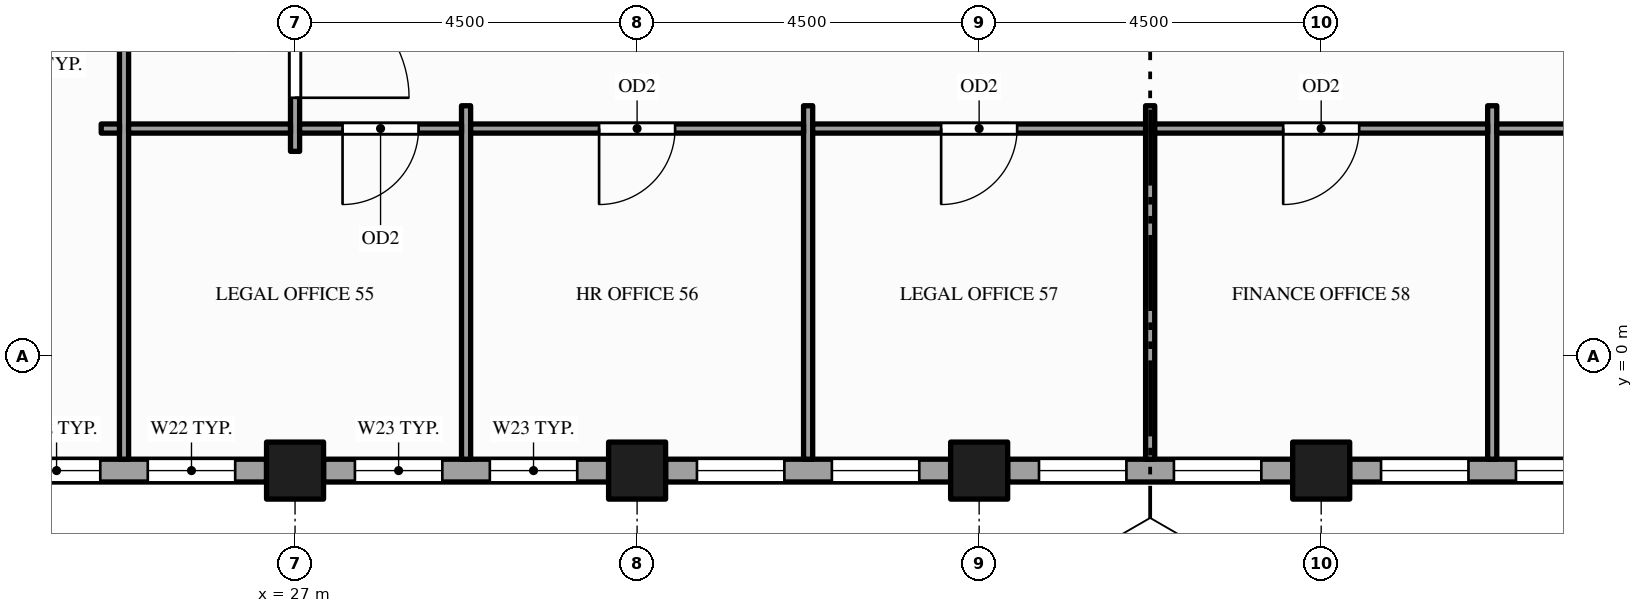
"""IFC4 building model, lengths in metres.
Left out: names, types, materials, properties, quantities, classifications, styles, units other than length and angle.
Written with IfcOpenShell. Run it as: python <this file> out.ifc"""

import sys

from ifc_helpers import new_model, si_unit, direction, frame, frame_2d, origin, origin_2d, place, context, subcontext, project, spatial, rectangle, hollow_rectangle, extrude, element, fill, save


model = new_model("IFC4")
c1 = context("Model", 3, precision=1e-05, world=origin(), true_north=direction((0.0, 1.0)))
c2 = subcontext(c1, "Body", "Model", "MODEL_VIEW")
j1 = project(units=[si_unit("LENGTHUNIT", "METRE"), si_unit("PLANEANGLEUNIT", "RADIAN")], contexts=[c1])
p1 = place(None, origin())
s1 = spatial("IfcSite", under=j1, at=p1, CompositionType="ELEMENT")
p2 = place(p1, origin())
s2 = spatial("IfcBuilding", under=s1, at=p2, CompositionType="ELEMENT")
p3 = place(p2, frame((0.0, 0.0, 195.0)))
s3 = spatial("IfcBuildingStorey", under=s2, at=p3, CompositionType="ELEMENT", Elevation=195.0)
for number, where, z_axis, x_axis in (
    (1, (27.0, -1.5, -0.15), (0.0, 0.0, 1.0), (1.0, 0.0, 0.0)),
    (2, (31.5, -1.5, -0.15), (0.0, 0.0, 1.0), (1.0, 0.0, 0.0)),
    (3, (36.0, -1.5, -0.15), (0.0, 0.0, 1.0), (1.0, 0.0, 0.0)),
    (4, (40.5, -1.5, -0.15), (0.0, 0.0, 1.0), (1.0, 0.0, 0.0)),
):
    element("IfcColumn", number, at=place(p3, frame(where, z_axis=z_axis, x_axis=x_axis)), inside=s3, PredefinedType="COLUMN", context=c2, shape_type="SweptSolid", body=[
        extrude(hollow_rectangle(XDim=0.75, YDim=0.75, WallThickness=0.036, at=origin_2d()), origin(), (0.0, 0.0, 1.0), 4.0),
    ])
p4 = place(p3, frame((22.875, -1.5, 0.0), z_axis=(0.0, 0.0, 1.0), x_axis=(1.0, 0.0, 0.0)))
e5 = element("IfcWall", 5, at=p4, inside=s3, PredefinedType="STANDARD", context=c2, shape_type="SweptSolid", body=[
    extrude(rectangle(XDim=3.75, YDim=0.3, at=frame_2d((1.875, 0.0))), origin(), (0.0, 0.0, 1.0), 2.76),
])
p5 = place(p4, frame((0.413, 0.0, 0.9)))
e6 = element("IfcOpeningElement", 6, at=p5, cuts=e5, PredefinedType="OPENING", context=c2, shape_type="SweptSolid", body=[
    extrude(rectangle(XDim=1.15, YDim=1.5, at=frame_2d((0.575, 0.75))), frame((0.0, 0.16, 0.0), z_axis=(0.0, -1.0, 0.0), x_axis=(1.0, 0.0, 0.0)), (0.0, 0.0, 1.0), 0.32),
])
p6 = place(p4, frame((2.188, 0.0, 0.9)))
e7 = element("IfcOpeningElement", 7, at=p6, cuts=e5, PredefinedType="OPENING", context=c2, shape_type="SweptSolid", body=[
    extrude(rectangle(XDim=1.15, YDim=1.5, at=frame_2d((0.575, 0.75))), frame((0.0, 0.16, 0.0), z_axis=(0.0, -1.0, 0.0), x_axis=(1.0, 0.0, 0.0)), (0.0, 0.0, 1.0), 0.32),
])
p7 = place(p3, frame((27.375, -1.5, 0.0), z_axis=(0.0, 0.0, 1.0), x_axis=(1.0, 0.0, 0.0)))
e8 = element("IfcWall", 8, at=p7, inside=s3, PredefinedType="STANDARD", context=c2, shape_type="SweptSolid", body=[
    extrude(rectangle(XDim=3.75, YDim=0.3, at=frame_2d((1.875, 0.0))), origin(), (0.0, 0.0, 1.0), 2.87),
])
p8 = place(p7, frame((0.413, 0.0, 0.9)))
e9 = element("IfcOpeningElement", 9, at=p8, cuts=e8, PredefinedType="OPENING", context=c2, shape_type="SweptSolid", body=[
    extrude(rectangle(XDim=1.15, YDim=1.75, at=frame_2d((0.575, 0.875))), frame((0.0, 0.16, 0.0), z_axis=(0.0, -1.0, 0.0), x_axis=(1.0, 0.0, 0.0)), (0.0, 0.0, 1.0), 0.32),
])
p9 = place(p7, frame((2.188, 0.0, 0.9)))
e10 = element("IfcOpeningElement", 10, at=p9, cuts=e8, PredefinedType="OPENING", context=c2, shape_type="SweptSolid", body=[
    extrude(rectangle(XDim=1.15, YDim=1.75, at=frame_2d((0.575, 0.875))), frame((0.0, 0.16, 0.0), z_axis=(0.0, -1.0, 0.0), x_axis=(1.0, 0.0, 0.0)), (0.0, 0.0, 1.0), 0.32),
])
p10 = place(p3, frame((31.875, -1.5, 0.0), z_axis=(0.0, 0.0, 1.0), x_axis=(1.0, 0.0, 0.0)))
e11 = element("IfcWall", 11, at=p10, inside=s3, PredefinedType="STANDARD", context=c2, shape_type="SweptSolid", body=[
    extrude(rectangle(XDim=3.75, YDim=0.3, at=frame_2d((1.875, 0.0))), origin(), (0.0, 0.0, 1.0), 2.87),
])
p11 = place(p10, frame((0.413, 0.0, 0.9)))
e12 = element("IfcOpeningElement", 12, at=p11, cuts=e11, PredefinedType="OPENING", context=c2, shape_type="SweptSolid", body=[
    extrude(rectangle(XDim=1.15, YDim=1.75, at=frame_2d((0.575, 0.875))), frame((0.0, 0.16, 0.0), z_axis=(0.0, -1.0, 0.0), x_axis=(1.0, 0.0, 0.0)), (0.0, 0.0, 1.0), 0.32),
])
p12 = place(p10, frame((2.188, 0.0, 0.9)))
e13 = element("IfcOpeningElement", 13, at=p12, cuts=e11, PredefinedType="OPENING", context=c2, shape_type="SweptSolid", body=[
    extrude(rectangle(XDim=1.15, YDim=1.75, at=frame_2d((0.575, 0.875))), frame((0.0, 0.16, 0.0), z_axis=(0.0, -1.0, 0.0), x_axis=(1.0, 0.0, 0.0)), (0.0, 0.0, 1.0), 0.32),
])
p13 = place(p3, frame((36.375, -1.5, 0.0), z_axis=(0.0, 0.0, 1.0), x_axis=(1.0, 0.0, 0.0)))
e14 = element("IfcWall", 14, at=p13, inside=s3, PredefinedType="STANDARD", context=c2, shape_type="SweptSolid", body=[
    extrude(rectangle(XDim=3.75, YDim=0.3, at=frame_2d((1.875, 0.0))), origin(), (0.0, 0.0, 1.0), 2.87),
])
p14 = place(p13, frame((0.413, 0.0, 0.9)))
e15 = element("IfcOpeningElement", 15, at=p14, cuts=e14, PredefinedType="OPENING", context=c2, shape_type="SweptSolid", body=[
    extrude(rectangle(XDim=1.15, YDim=1.75, at=frame_2d((0.575, 0.875))), frame((0.0, 0.16, 0.0), z_axis=(0.0, -1.0, 0.0), x_axis=(1.0, 0.0, 0.0)), (0.0, 0.0, 1.0), 0.32),
])
p15 = place(p13, frame((2.188, 0.0, 0.9)))
e16 = element("IfcOpeningElement", 16, at=p15, cuts=e14, PredefinedType="OPENING", context=c2, shape_type="SweptSolid", body=[
    extrude(rectangle(XDim=1.15, YDim=1.75, at=frame_2d((0.575, 0.875))), frame((0.0, 0.16, 0.0), z_axis=(0.0, -1.0, 0.0), x_axis=(1.0, 0.0, 0.0)), (0.0, 0.0, 1.0), 0.32),
])
p16 = place(p3, frame((40.875, -1.5, 0.0), z_axis=(0.0, 0.0, 1.0), x_axis=(1.0, 0.0, 0.0)))
e17 = element("IfcWall", 17, at=p16, inside=s3, PredefinedType="STANDARD", context=c2, shape_type="SweptSolid", body=[
    extrude(rectangle(XDim=3.75, YDim=0.3, at=frame_2d((1.875, 0.0))), origin(), (0.0, 0.0, 1.0), 2.87),
])
p17 = place(p16, frame((0.413, 0.0, 0.9)))
e18 = element("IfcOpeningElement", 18, at=p17, cuts=e17, PredefinedType="OPENING", context=c2, shape_type="SweptSolid", body=[
    extrude(rectangle(XDim=1.15, YDim=1.75, at=frame_2d((0.575, 0.875))), frame((0.0, 0.16, 0.0), z_axis=(0.0, -1.0, 0.0), x_axis=(1.0, 0.0, 0.0)), (0.0, 0.0, 1.0), 0.32),
])
p18 = place(p16, frame((2.188, 0.0, 0.9)))
e19 = element("IfcOpeningElement", 19, at=p18, cuts=e17, PredefinedType="OPENING", context=c2, shape_type="SweptSolid", body=[
    extrude(rectangle(XDim=1.15, YDim=1.75, at=frame_2d((0.575, 0.875))), frame((0.0, 0.16, 0.0), z_axis=(0.0, -1.0, 0.0), x_axis=(1.0, 0.0, 0.0)), (0.0, 0.0, 1.0), 0.32),
])
p19 = place(p3, frame((24.75, -1.35, 0.0), z_axis=(0.0, 0.0, 1.0), x_axis=(0.0, 1.0, 0.0)))
e20 = element("IfcWall", 20, at=p19, inside=s3, PredefinedType="PARTITIONING", context=c2, shape_type="SweptSolid", body=[
    extrude(rectangle(XDim=24.101, YDim=0.12, at=frame_2d((12.05, 0.0))), origin(), (0.0, 0.0, 1.0), 2.76),
])
p20 = place(p19, frame((10.725, 0.0, 0.0)))
e21 = element("IfcOpeningElement", 21, at=p20, cuts=e20, PredefinedType="OPENING", context=c2, shape_type="SweptSolid", body=[
    extrude(rectangle(XDim=1.5, YDim=2.1, at=frame_2d((0.75, 1.05))), frame((0.0, 0.07, 0.0), z_axis=(0.0, -1.0, 0.0), x_axis=(1.0, 0.0, 0.0)), (0.0, 0.0, 1.0), 0.14),
])
p21 = place(p19, frame((14.625, 0.0, 0.0)))
e22 = element("IfcOpeningElement", 22, at=p21, cuts=e20, PredefinedType="OPENING", context=c2, shape_type="SweptSolid", body=[
    extrude(rectangle(XDim=1.2, YDim=2.1, at=frame_2d((0.6, 1.05))), frame((0.0, 0.07, 0.0), z_axis=(0.0, -1.0, 0.0), x_axis=(1.0, 0.0, 0.0)), (0.0, 0.0, 1.0), 0.14),
])
p22 = place(p3, frame((27.0, 2.7, 0.0), z_axis=(0.0, 0.0, 1.0), x_axis=(0.0, 1.0, 0.0)))
e23 = element("IfcWall", 23, at=p22, inside=s3, PredefinedType="PARTITIONING", context=c2, shape_type="SweptSolid", body=[
    extrude(rectangle(XDim=14.1, YDim=0.12, at=frame_2d((7.05, 0.0))), origin(), (0.0, 0.0, 1.0), 2.87),
])
p23 = place(p22, frame((0.705, 0.0, 0.0)))
e24 = element("IfcOpeningElement", 24, at=p23, cuts=e23, PredefinedType="OPENING", context=c2, shape_type="SweptSolid", body=[
    extrude(rectangle(XDim=1.5, YDim=2.1, at=frame_2d((0.75, 1.05))), frame((0.0, 0.07, 0.0), z_axis=(0.0, -1.0, 0.0), x_axis=(1.0, 0.0, 0.0)), (0.0, 0.0, 1.0), 0.14),
])
p24 = place(p22, frame((11.895, 0.0, 0.0)))
e25 = element("IfcOpeningElement", 25, at=p24, cuts=e23, PredefinedType="OPENING", context=c2, shape_type="SweptSolid", body=[
    extrude(rectangle(XDim=1.5, YDim=2.1, at=frame_2d((0.75, 1.05))), frame((0.0, 0.07, 0.0), z_axis=(0.0, -1.0, 0.0), x_axis=(1.0, 0.0, 0.0)), (0.0, 0.0, 1.0), 0.14),
])
for number, where, z_axis, x_axis in (
    (26, (29.25, -1.35, 0.0), (0.0, 0.0, 1.0), (0.0, 1.0, 0.0)),
    (27, (33.75, -1.35, 0.0), (0.0, 0.0, 1.0), (0.0, 1.0, 0.0)),
    (28, (38.25, -1.35, 0.0), (0.0, 0.0, 1.0), (0.0, 1.0, 0.0)),
    (29, (42.75, -1.35, 0.0), (0.0, 0.0, 1.0), (0.0, 1.0, 0.0)),
):
    element("IfcWall", number, at=place(p3, frame(where, z_axis=z_axis, x_axis=x_axis)), inside=s3, PredefinedType="PARTITIONING", context=c2, shape_type="SweptSolid", body=[
        extrude(rectangle(XDim=4.65, YDim=0.12, at=frame_2d((2.325, 0.0))), origin(), (0.0, 0.0, 1.0), 2.87),
    ])
p25 = place(p3, frame((24.45, 3.0, 0.0), z_axis=(0.0, 0.0, 1.0), x_axis=(1.0, 0.0, 0.0)))
e30 = element("IfcWall", 30, at=p25, inside=s3, PredefinedType="PARTITIONING", context=c2, shape_type="SweptSolid", body=[
    extrude(rectangle(XDim=0.24, YDim=0.12, at=frame_2d((0.12, 0.0))), origin(), (0.0, 0.0, 1.0), 2.76),
])
p26 = place(p3, frame((24.81, 3.0, 0.0), z_axis=(0.0, 0.0, 1.0), x_axis=(1.0, 0.0, 0.0)))
e31 = element("IfcWall", 31, at=p26, inside=s3, PredefinedType="PARTITIONING", context=c2, shape_type="SweptSolid", body=[
    extrude(rectangle(XDim=2.13, YDim=0.12, at=frame_2d((1.065, 0.0))), origin(), (0.0, 0.0, 1.0), 2.76),
])
p27 = place(p3, frame((27.06, 3.0, 0.0), z_axis=(0.0, 0.0, 1.0), x_axis=(1.0, 0.0, 0.0)))
e32 = element("IfcWall", 32, at=p27, inside=s3, PredefinedType="PARTITIONING", context=c2, shape_type="SweptSolid", body=[
    extrude(rectangle(XDim=2.13, YDim=0.12, at=frame_2d((1.065, 0.0))), origin(), (0.0, 0.0, 1.0), 2.87),
])
p28 = place(p27, frame((0.565, 0.0, 0.0)))
e33 = element("IfcOpeningElement", 33, at=p28, cuts=e32, PredefinedType="OPENING", context=c2, shape_type="SweptSolid", body=[
    extrude(rectangle(XDim=1.0, YDim=2.1, at=frame_2d((0.5, 1.05))), frame((0.0, 0.07, 0.0), z_axis=(0.0, -1.0, 0.0), x_axis=(1.0, 0.0, 0.0)), (0.0, 0.0, 1.0), 0.14),
])
p29 = place(p3, frame((29.31, 3.0, 0.0), z_axis=(0.0, 0.0, 1.0), x_axis=(1.0, 0.0, 0.0)))
e34 = element("IfcWall", 34, at=p29, inside=s3, PredefinedType="PARTITIONING", context=c2, shape_type="SweptSolid", body=[
    extrude(rectangle(XDim=4.38, YDim=0.12, at=frame_2d((2.19, 0.0))), origin(), (0.0, 0.0, 1.0), 2.87),
])
p30 = place(p29, frame((1.69, 0.0, 0.0)))
e35 = element("IfcOpeningElement", 35, at=p30, cuts=e34, PredefinedType="OPENING", context=c2, shape_type="SweptSolid", body=[
    extrude(rectangle(XDim=1.0, YDim=2.1, at=frame_2d((0.5, 1.05))), frame((0.0, 0.07, 0.0), z_axis=(0.0, -1.0, 0.0), x_axis=(1.0, 0.0, 0.0)), (0.0, 0.0, 1.0), 0.14),
])
p31 = place(p3, frame((33.81, 3.0, 0.0), z_axis=(0.0, 0.0, 1.0), x_axis=(1.0, 0.0, 0.0)))
e36 = element("IfcWall", 36, at=p31, inside=s3, PredefinedType="PARTITIONING", context=c2, shape_type="SweptSolid", body=[
    extrude(rectangle(XDim=4.38, YDim=0.12, at=frame_2d((2.19, 0.0))), origin(), (0.0, 0.0, 1.0), 2.87),
])
p32 = place(p31, frame((1.69, 0.0, 0.0)))
e37 = element("IfcOpeningElement", 37, at=p32, cuts=e36, PredefinedType="OPENING", context=c2, shape_type="SweptSolid", body=[
    extrude(rectangle(XDim=1.0, YDim=2.1, at=frame_2d((0.5, 1.05))), frame((0.0, 0.07, 0.0), z_axis=(0.0, -1.0, 0.0), x_axis=(1.0, 0.0, 0.0)), (0.0, 0.0, 1.0), 0.14),
])
p33 = place(p3, frame((38.31, 3.0, 0.0), z_axis=(0.0, 0.0, 1.0), x_axis=(1.0, 0.0, 0.0)))
e38 = element("IfcWall", 38, at=p33, inside=s3, PredefinedType="PARTITIONING", context=c2, shape_type="SweptSolid", body=[
    extrude(rectangle(XDim=4.38, YDim=0.12, at=frame_2d((2.19, 0.0))), origin(), (0.0, 0.0, 1.0), 2.87),
])
p34 = place(p33, frame((1.69, 0.0, 0.0)))
e39 = element("IfcOpeningElement", 39, at=p34, cuts=e38, PredefinedType="OPENING", context=c2, shape_type="SweptSolid", body=[
    extrude(rectangle(XDim=1.0, YDim=2.1, at=frame_2d((0.5, 1.05))), frame((0.0, 0.07, 0.0), z_axis=(0.0, -1.0, 0.0), x_axis=(1.0, 0.0, 0.0)), (0.0, 0.0, 1.0), 0.14),
])
p35 = place(p3, frame((42.81, 3.0, 0.0), z_axis=(0.0, 0.0, 1.0), x_axis=(1.0, 0.0, 0.0)))
e40 = element("IfcWall", 40, at=p35, inside=s3, PredefinedType="PARTITIONING", context=c2, shape_type="SweptSolid", body=[
    extrude(rectangle(XDim=6.63, YDim=0.12, at=frame_2d((3.315, 0.0))), origin(), (0.0, 0.0, 1.0), 2.87),
])
p36 = place(p35, frame((2.715, 0.0, 0.0)))
e41 = element("IfcOpeningElement", 41, at=p36, cuts=e40, PredefinedType="OPENING", context=c2, shape_type="SweptSolid", body=[
    extrude(rectangle(XDim=1.2, YDim=2.1, at=frame_2d((0.6, 1.05))), frame((0.0, 0.07, 0.0), z_axis=(0.0, -1.0, 0.0), x_axis=(1.0, 0.0, 0.0)), (0.0, 0.0, 1.0), 0.14),
])
p37 = place(p5, origin())
e42 = element("IfcWindow", 42, at=p37, inside=s3, PartitioningType="SINGLE_PANEL", PredefinedType="WINDOW", context=c2, shape_type="SweptSolid", body=[
    extrude(rectangle(XDim=1.15, YDim=1.5, at=frame_2d((0.575, 0.75))), frame((0.0, 0.03, 0.0), z_axis=(0.0, -1.0, 0.0), x_axis=(1.0, 0.0, 0.0)), (0.0, 0.0, 1.0), 0.06),
])
fill(e6, e42)
p38 = place(p6, origin())
e43 = element("IfcWindow", 43, at=p38, inside=s3, PartitioningType="SINGLE_PANEL", PredefinedType="WINDOW", context=c2, shape_type="SweptSolid", body=[
    extrude(rectangle(XDim=1.15, YDim=1.5, at=frame_2d((0.575, 0.75))), frame((0.0, 0.03, 0.0), z_axis=(0.0, -1.0, 0.0), x_axis=(1.0, 0.0, 0.0)), (0.0, 0.0, 1.0), 0.06),
])
fill(e7, e43)
p39 = place(p8, origin())
e44 = element("IfcWindow", 44, at=p39, inside=s3, PartitioningType="SINGLE_PANEL", PredefinedType="WINDOW", context=c2, shape_type="SweptSolid", body=[
    extrude(rectangle(XDim=1.15, YDim=1.75, at=frame_2d((0.575, 0.875))), frame((0.0, 0.03, 0.0), z_axis=(0.0, -1.0, 0.0), x_axis=(1.0, 0.0, 0.0)), (0.0, 0.0, 1.0), 0.06),
])
fill(e9, e44)
p40 = place(p9, origin())
e45 = element("IfcWindow", 45, at=p40, inside=s3, PartitioningType="SINGLE_PANEL", PredefinedType="WINDOW", context=c2, shape_type="SweptSolid", body=[
    extrude(rectangle(XDim=1.15, YDim=1.75, at=frame_2d((0.575, 0.875))), frame((0.0, 0.03, 0.0), z_axis=(0.0, -1.0, 0.0), x_axis=(1.0, 0.0, 0.0)), (0.0, 0.0, 1.0), 0.06),
])
fill(e10, e45)
p41 = place(p11, origin())
e46 = element("IfcWindow", 46, at=p41, inside=s3, PartitioningType="SINGLE_PANEL", PredefinedType="WINDOW", context=c2, shape_type="SweptSolid", body=[
    extrude(rectangle(XDim=1.15, YDim=1.75, at=frame_2d((0.575, 0.875))), frame((0.0, 0.03, 0.0), z_axis=(0.0, -1.0, 0.0), x_axis=(1.0, 0.0, 0.0)), (0.0, 0.0, 1.0), 0.06),
])
fill(e12, e46)
p42 = place(p12, origin())
e47 = element("IfcWindow", 47, at=p42, inside=s3, PartitioningType="SINGLE_PANEL", PredefinedType="WINDOW", context=c2, shape_type="SweptSolid", body=[
    extrude(rectangle(XDim=1.15, YDim=1.75, at=frame_2d((0.575, 0.875))), frame((0.0, 0.03, 0.0), z_axis=(0.0, -1.0, 0.0), x_axis=(1.0, 0.0, 0.0)), (0.0, 0.0, 1.0), 0.06),
])
fill(e13, e47)
p43 = place(p14, origin())
e48 = element("IfcWindow", 48, at=p43, inside=s3, PartitioningType="SINGLE_PANEL", PredefinedType="WINDOW", context=c2, shape_type="SweptSolid", body=[
    extrude(rectangle(XDim=1.15, YDim=1.75, at=frame_2d((0.575, 0.875))), frame((0.0, 0.03, 0.0), z_axis=(0.0, -1.0, 0.0), x_axis=(1.0, 0.0, 0.0)), (0.0, 0.0, 1.0), 0.06),
])
fill(e15, e48)
p44 = place(p15, origin())
e49 = element("IfcWindow", 49, at=p44, inside=s3, PartitioningType="SINGLE_PANEL", PredefinedType="WINDOW", context=c2, shape_type="SweptSolid", body=[
    extrude(rectangle(XDim=1.15, YDim=1.75, at=frame_2d((0.575, 0.875))), frame((0.0, 0.03, 0.0), z_axis=(0.0, -1.0, 0.0), x_axis=(1.0, 0.0, 0.0)), (0.0, 0.0, 1.0), 0.06),
])
fill(e16, e49)
p45 = place(p17, origin())
e50 = element("IfcWindow", 50, at=p45, inside=s3, PartitioningType="SINGLE_PANEL", PredefinedType="WINDOW", context=c2, shape_type="SweptSolid", body=[
    extrude(rectangle(XDim=1.15, YDim=1.75, at=frame_2d((0.575, 0.875))), frame((0.0, 0.03, 0.0), z_axis=(0.0, -1.0, 0.0), x_axis=(1.0, 0.0, 0.0)), (0.0, 0.0, 1.0), 0.06),
])
fill(e18, e50)
p46 = place(p18, origin())
e51 = element("IfcWindow", 51, at=p46, inside=s3, PartitioningType="SINGLE_PANEL", PredefinedType="WINDOW", context=c2, shape_type="SweptSolid", body=[
    extrude(rectangle(XDim=1.15, YDim=1.75, at=frame_2d((0.575, 0.875))), frame((0.0, 0.03, 0.0), z_axis=(0.0, -1.0, 0.0), x_axis=(1.0, 0.0, 0.0)), (0.0, 0.0, 1.0), 0.06),
])
fill(e19, e51)
p47 = place(p23, origin())
e52 = element("IfcDoor", 52, at=p47, inside=s3, OperationType="SINGLE_SWING_LEFT", PredefinedType="DOOR", context=c2, shape_type="SweptSolid", body=[
    extrude(rectangle(XDim=1.5, YDim=2.1, at=frame_2d((0.75, 1.05))), frame((0.0, 0.025, 0.0), z_axis=(0.0, -1.0, 0.0), x_axis=(1.0, 0.0, 0.0)), (0.0, 0.0, 1.0), 0.05),
])
fill(e24, e52)
p48 = place(p28, origin())
e53 = element("IfcDoor", 53, at=p48, inside=s3, OperationType="SINGLE_SWING_LEFT", PredefinedType="DOOR", context=c2, shape_type="SweptSolid", body=[
    extrude(rectangle(XDim=1.0, YDim=2.1, at=frame_2d((0.5, 1.05))), frame((0.0, 0.025, 0.0), z_axis=(0.0, -1.0, 0.0), x_axis=(1.0, 0.0, 0.0)), (0.0, 0.0, 1.0), 0.05),
])
fill(e33, e53)
p49 = place(p30, origin())
e54 = element("IfcDoor", 54, at=p49, inside=s3, OperationType="SINGLE_SWING_LEFT", PredefinedType="DOOR", context=c2, shape_type="SweptSolid", body=[
    extrude(rectangle(XDim=1.0, YDim=2.1, at=frame_2d((0.5, 1.05))), frame((0.0, 0.025, 0.0), z_axis=(0.0, -1.0, 0.0), x_axis=(1.0, 0.0, 0.0)), (0.0, 0.0, 1.0), 0.05),
])
fill(e35, e54)
p50 = place(p32, origin())
e55 = element("IfcDoor", 55, at=p50, inside=s3, OperationType="SINGLE_SWING_LEFT", PredefinedType="DOOR", context=c2, shape_type="SweptSolid", body=[
    extrude(rectangle(XDim=1.0, YDim=2.1, at=frame_2d((0.5, 1.05))), frame((0.0, 0.025, 0.0), z_axis=(0.0, -1.0, 0.0), x_axis=(1.0, 0.0, 0.0)), (0.0, 0.0, 1.0), 0.05),
])
fill(e37, e55)
p51 = place(p34, origin())
e56 = element("IfcDoor", 56, at=p51, inside=s3, OperationType="SINGLE_SWING_LEFT", PredefinedType="DOOR", context=c2, shape_type="SweptSolid", body=[
    extrude(rectangle(XDim=1.0, YDim=2.1, at=frame_2d((0.5, 1.05))), frame((0.0, 0.025, 0.0), z_axis=(0.0, -1.0, 0.0), x_axis=(1.0, 0.0, 0.0)), (0.0, 0.0, 1.0), 0.05),
])
fill(e39, e56)
save(model, sys.argv[1])
